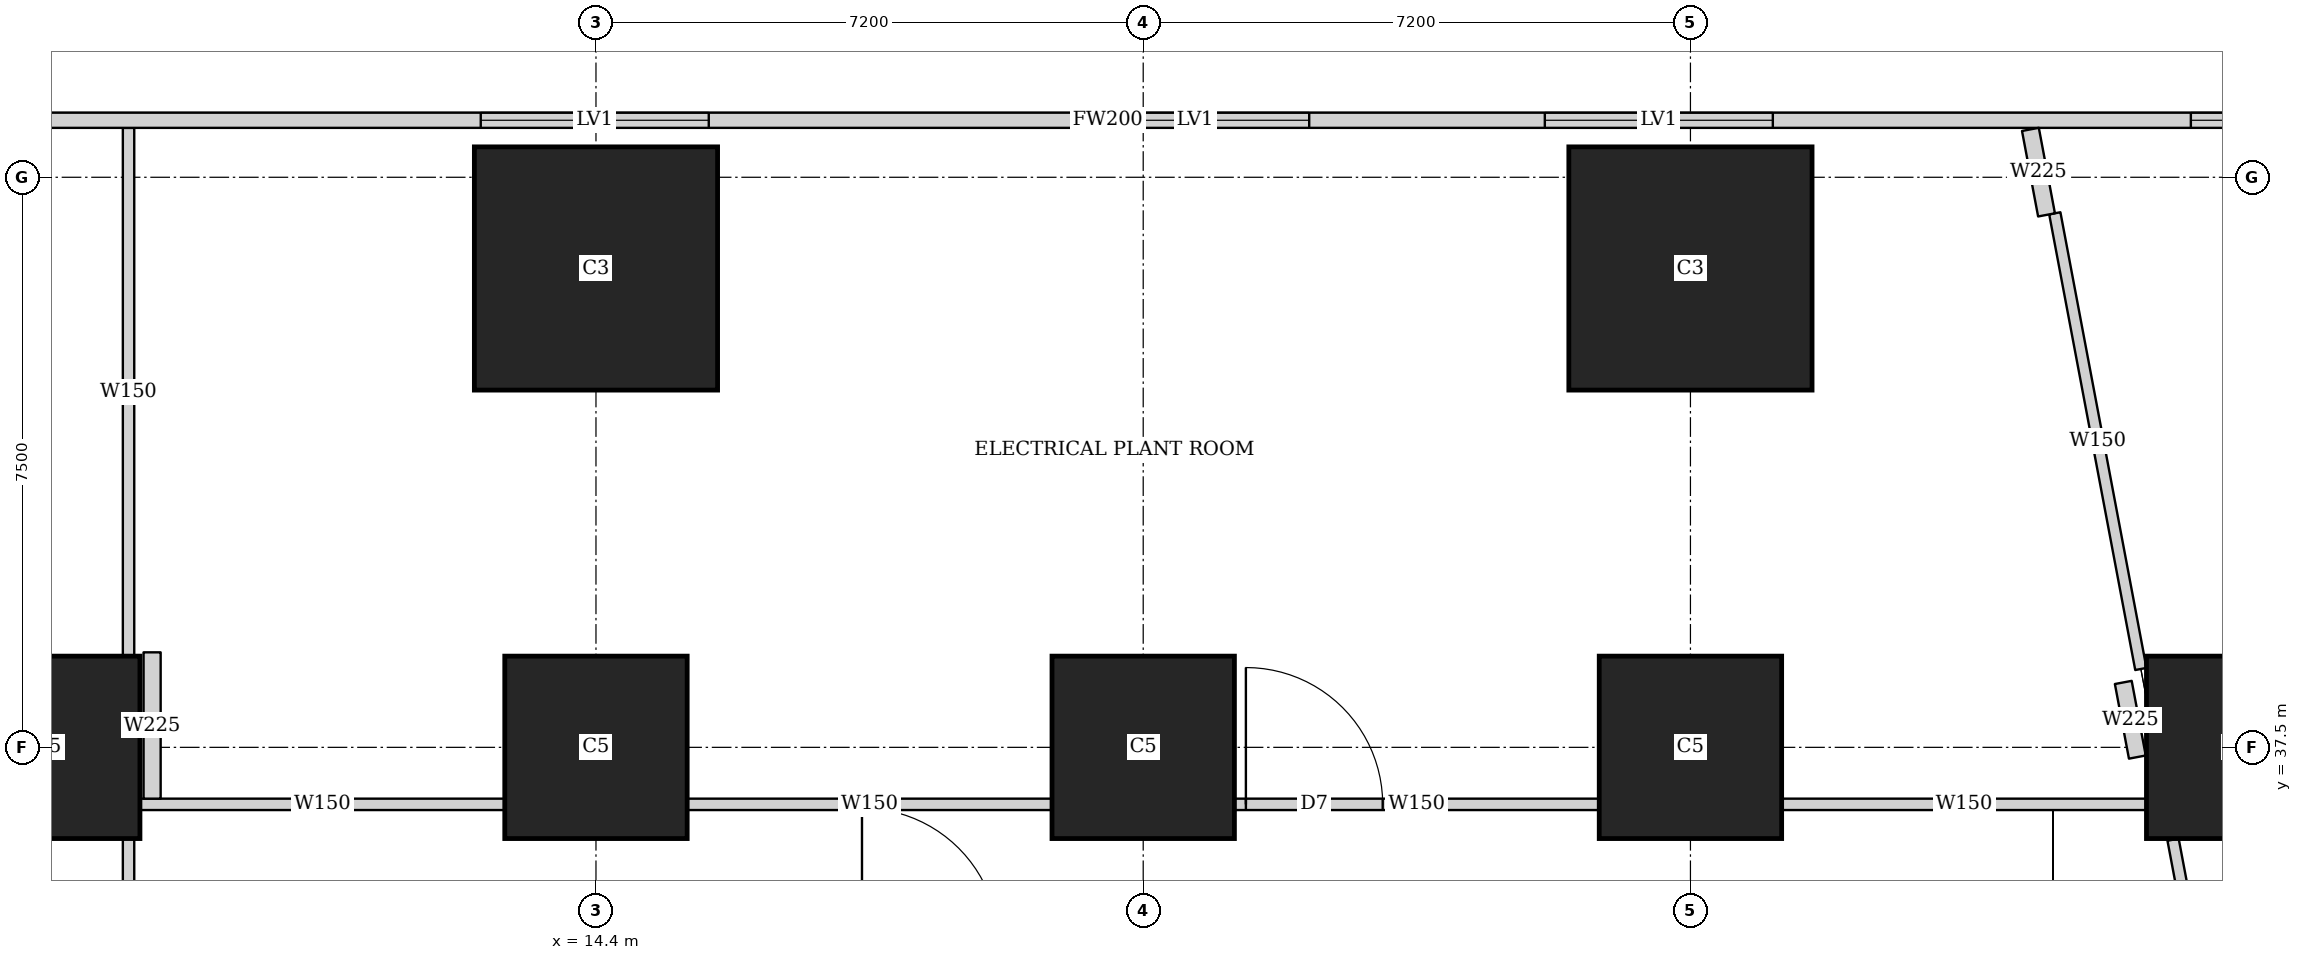
"""IFC4 building model, lengths in metres.
Left out: names, types, materials, properties, quantities, classifications, styles, units other than length and angle.
Written with IfcOpenShell. Run it as: python <this file> out.ifc"""

import sys

from ifc_helpers import new_model, si_unit, direction, frame, frame_2d, origin, origin_2d, place, context, subcontext, project, spatial, rectangle, extrude, element, fill, save


model = new_model("IFC4")
c1 = context("Model", 3, precision=1e-05, world=origin(), true_north=direction((0.0, 1.0)))
c2 = subcontext(c1, "Body", "Model", "MODEL_VIEW")
j1 = project(units=[si_unit("LENGTHUNIT", "METRE"), si_unit("PLANEANGLEUNIT", "RADIAN")], contexts=[c1])
p1 = place(None, origin())
s1 = spatial("IfcSite", under=j1, at=p1, CompositionType="ELEMENT")
p2 = place(p1, origin())
s2 = spatial("IfcBuilding", under=s1, at=p2, CompositionType="ELEMENT")
p3 = place(p2, frame((0.0, 0.0, 14.6)))
s3 = spatial("IfcBuildingStorey", under=s2, at=p3, CompositionType="ELEMENT", Elevation=14.6)
for number, where, z_axis, x_axis in (
    (1, (7.2, 37.5, 0.0), (0.0, 0.0, 1.0), (1.0, 0.0, 0.0)),
    (2, (14.4, 37.5, 0.0), (0.0, 0.0, 1.0), (1.0, 0.0, 0.0)),
    (3, (21.6, 37.5, 0.0), (0.0, 0.0, 1.0), (1.0, 0.0, 0.0)),
    (4, (28.8, 37.5, 0.0), (0.0, 0.0, 1.0), (1.0, 0.0, 0.0)),
    (5, (36.0, 37.5, 0.0), (0.0, 0.0, 1.0), (1.0, 0.0, 0.0)),
):
    element("IfcColumn", number, at=place(p3, frame(where, z_axis=z_axis, x_axis=x_axis)), inside=s3, PredefinedType="COLUMN", context=c2, shape_type="SweptSolid", body=[
        extrude(rectangle(XDim=2.4, YDim=2.4, at=origin_2d()), origin(), (0.0, 0.0, 1.0), 5.4),
    ])
for number, where, z_axis, x_axis in (
    (6, (14.4, 43.8, 0.0), (0.0, 0.0, 1.0), (1.0, 0.0, 0.0)),
    (7, (28.8, 43.8, 0.0), (0.0, 0.0, 1.0), (1.0, 0.0, 0.0)),
):
    element("IfcColumn", number, at=place(p3, frame(where, z_axis=z_axis, x_axis=x_axis)), inside=s3, PredefinedType="COLUMN", context=c2, shape_type="SweptSolid", body=[
        extrude(rectangle(XDim=3.2, YDim=3.2, at=origin_2d()), origin(), (0.0, 0.0, 1.0), 5.4),
    ])
p4 = place(p3, frame((40.106, 45.75, 0.0), z_axis=(0.0, 0.0, 1.0), x_axis=(-1.0, 0.0, 0.0)))
e8 = element("IfcWall", 8, at=p4, inside=s3, PredefinedType="SOLIDWALL", context=c2, shape_type="SweptSolid", body=[
    extrude(rectangle(XDim=37.943, YDim=0.2, at=frame_2d((18.971, 0.0))), origin(), (0.0, 0.0, 1.0), 5.1),
])
p5 = place(p4, frame((1.722, 0.0, 0.6)))
e9 = element("IfcOpeningElement", 9, at=p5, cuts=e8, PredefinedType="OPENING", context=c2, shape_type="SweptSolid", body=[
    extrude(rectangle(XDim=3.0, YDim=2.4, at=frame_2d((1.5, 1.2))), frame((0.0, 0.11, 0.0), z_axis=(0.0, -1.0, 0.0), x_axis=(1.0, 0.0, 0.0)), (0.0, 0.0, 1.0), 0.22),
])
p6 = place(p4, frame((10.222, 0.0, 0.6)))
e10 = element("IfcOpeningElement", 10, at=p6, cuts=e8, PredefinedType="OPENING", context=c2, shape_type="SweptSolid", body=[
    extrude(rectangle(XDim=3.0, YDim=2.4, at=frame_2d((1.5, 1.2))), frame((0.0, 0.11, 0.0), z_axis=(0.0, -1.0, 0.0), x_axis=(1.0, 0.0, 0.0)), (0.0, 0.0, 1.0), 0.22),
])
p7 = place(p4, frame((16.322, 0.0, 0.6)))
e11 = element("IfcOpeningElement", 11, at=p7, cuts=e8, PredefinedType="OPENING", context=c2, shape_type="SweptSolid", body=[
    extrude(rectangle(XDim=3.0, YDim=2.4, at=frame_2d((1.5, 1.2))), frame((0.0, 0.11, 0.0), z_axis=(0.0, -1.0, 0.0), x_axis=(1.0, 0.0, 0.0)), (0.0, 0.0, 1.0), 0.22),
])
p8 = place(p4, frame((24.222, 0.0, 0.6)))
e12 = element("IfcOpeningElement", 12, at=p8, cuts=e8, PredefinedType="OPENING", context=c2, shape_type="SweptSolid", body=[
    extrude(rectangle(XDim=3.0, YDim=2.4, at=frame_2d((1.5, 1.2))), frame((0.0, 0.11, 0.0), z_axis=(0.0, -1.0, 0.0), x_axis=(1.0, 0.0, 0.0)), (0.0, 0.0, 1.0), 0.22),
])
p9 = place(p4, frame((33.222, 0.0, 0.6)))
e13 = element("IfcOpeningElement", 13, at=p9, cuts=e8, PredefinedType="OPENING", context=c2, shape_type="SweptSolid", body=[
    extrude(rectangle(XDim=3.0, YDim=2.4, at=frame_2d((1.5, 1.2))), frame((0.0, 0.11, 0.0), z_axis=(0.0, -1.0, 0.0), x_axis=(1.0, 0.0, 0.0)), (0.0, 0.0, 1.0), 0.22),
])
p10 = place(p3, frame((8.25, 31.201, 0.0), z_axis=(0.0, 0.0, 1.0), x_axis=(0.0, 1.0, 0.0)))
e14 = element("IfcWall", 14, at=p10, inside=s3, PredefinedType="SOLIDWALL", context=c2, shape_type="SweptSolid", body=[
    extrude(rectangle(XDim=5.098, YDim=0.15, at=frame_2d((2.549, 0.0))), origin(), (0.0, 0.0, 1.0), 5.1),
])
p11 = place(p3, frame((8.25, 38.701, 0.0), z_axis=(0.0, 0.0, 1.0), x_axis=(0.0, 1.0, 0.0)))
e15 = element("IfcWall", 15, at=p11, inside=s3, PredefinedType="SOLIDWALL", context=c2, shape_type="SweptSolid", body=[
    extrude(rectangle(XDim=6.949, YDim=0.15, at=frame_2d((3.475, 0.0))), origin(), (0.0, 0.0, 1.0), 5.1),
])
p12 = place(p3, frame((8.401, 36.75, 0.0), z_axis=(0.0, 0.0, 1.0), x_axis=(1.0, 0.0, 0.0)))
e16 = element("IfcWall", 16, at=p12, inside=s3, PredefinedType="SOLIDWALL", context=c2, shape_type="SweptSolid", body=[
    extrude(rectangle(XDim=4.798, YDim=0.15, at=frame_2d((2.399, 0.0))), origin(), (0.0, 0.0, 1.0), 3.5),
])
p13 = place(p3, frame((15.601, 36.75, 0.0), z_axis=(0.0, 0.0, 1.0), x_axis=(1.0, 0.0, 0.0)))
e17 = element("IfcWall", 17, at=p13, inside=s3, PredefinedType="SOLIDWALL", context=c2, shape_type="SweptSolid", body=[
    extrude(rectangle(XDim=4.798, YDim=0.15, at=frame_2d((2.399, 0.0))), origin(), (0.0, 0.0, 1.0), 3.5),
])
p14 = place(p3, frame((22.801, 36.75, 0.0), z_axis=(0.0, 0.0, 1.0), x_axis=(1.0, 0.0, 0.0)))
e18 = element("IfcWall", 18, at=p14, inside=s3, PredefinedType="SOLIDWALL", context=c2, shape_type="SweptSolid", body=[
    extrude(rectangle(XDim=4.798, YDim=0.15, at=frame_2d((2.399, 0.0))), origin(), (0.0, 0.0, 1.0), 3.5),
])
p15 = place(p14, frame((0.15, 0.0, 0.0)))
e19 = element("IfcOpeningElement", 19, at=p15, cuts=e18, PredefinedType="OPENING", context=c2, shape_type="SweptSolid", body=[
    extrude(rectangle(XDim=1.8, YDim=2.4, at=frame_2d((0.9, 1.2))), frame((0.0, 0.085, 0.0), z_axis=(0.0, -1.0, 0.0), x_axis=(1.0, 0.0, 0.0)), (0.0, 0.0, 1.0), 0.17),
])
p16 = place(p3, frame((30.001, 36.75, 0.0), z_axis=(0.0, 0.0, 1.0), x_axis=(1.0, 0.0, 0.0)))
e20 = element("IfcWall", 20, at=p16, inside=s3, PredefinedType="SOLIDWALL", context=c2, shape_type="SweptSolid", body=[
    extrude(rectangle(XDim=4.798, YDim=0.15, at=frame_2d((2.399, 0.0))), origin(), (0.0, 0.0, 1.0), 3.5),
])
p17 = place(p3, frame((33.594, 44.526, 0.0), z_axis=(0.0, 0.0, 1.0), x_axis=(0.18556169571, -0.982632615521, 0.0)))
e21 = element("IfcWall", 21, at=p17, inside=s3, PredefinedType="SOLIDWALL", context=c2, shape_type="SweptSolid", body=[
    extrude(rectangle(XDim=6.101, YDim=0.15, at=frame_2d((3.05, 0.0))), origin(), (0.0, 0.0, 1.0), 5.1),
])
p18 = place(p3, frame((35.15, 36.285, 0.0), z_axis=(0.0, 0.0, 1.0), x_axis=(0.185613484682, -0.982622834207, 0.0)))
e22 = element("IfcWall", 22, at=p18, inside=s3, PredefinedType="SOLIDWALL", context=c2, shape_type="SweptSolid", body=[
    extrude(rectangle(XDim=34.351, YDim=0.15, at=frame_2d((17.175, 0.0))), origin(), (0.0, 0.0, 1.0), 3.5),
])
p19 = place(p18, frame((13.652, 0.0, 0.0)))
e23 = element("IfcOpeningElement", 23, at=p19, cuts=e22, PredefinedType="OPENING", context=c2, shape_type="SweptSolid", body=[
    extrude(rectangle(XDim=1.8, YDim=2.4, at=frame_2d((0.9, 1.2))), frame((0.0, 0.085, 0.0), z_axis=(0.0, -1.0, 0.0), x_axis=(1.0, 0.0, 0.0)), (0.0, 0.0, 1.0), 0.17),
])
p20 = place(p3, frame((8.56, 36.825, 0.0), z_axis=(0.0, 0.0, 1.0), x_axis=(0.0, 1.0, 0.0)))
e24 = element("IfcWall", 24, at=p20, inside=s3, PredefinedType="SOLIDWALL", context=c2, shape_type="SweptSolid", body=[
    extrude(rectangle(XDim=1.925, YDim=0.225, at=frame_2d((0.962, 0.0))), origin(), (0.0, 0.0, 1.0), 3.5),
])
p21 = place(p3, frame((33.273, 45.63, 0.0), z_axis=(0.0, 0.0, 1.0), x_axis=(0.185318495177, -0.982678510676, 0.0)))
e25 = element("IfcWall", 25, at=p21, inside=s3, PredefinedType="SOLIDWALL", context=c2, shape_type="SweptSolid", body=[
    extrude(rectangle(XDim=1.145, YDim=0.225, at=frame_2d((0.572, 0.0))), origin(), (0.0, 0.0, 1.0), 5.1),
])
p22 = place(p3, frame((34.495, 38.354, 0.0), z_axis=(0.0, 0.0, 1.0), x_axis=(0.18496711727, -0.982744710252, 0.0)))
e26 = element("IfcWall", 26, at=p22, inside=s3, PredefinedType="SOLIDWALL", context=c2, shape_type="SweptSolid", body=[
    extrude(rectangle(XDim=0.999, YDim=0.225, at=frame_2d((0.5, 0.0))), origin(), (0.0, 0.0, 1.0), 3.5),
])
p23 = place(p5, origin())
e27 = element("IfcWindow", 27, at=p23, inside=s3, PartitioningType="SINGLE_PANEL", PredefinedType="USERDEFINED", context=c2, shape_type="SweptSolid", body=[
    extrude(rectangle(XDim=3.0, YDim=2.4, at=frame_2d((1.5, 1.2))), frame((0.0, 0.03, 0.0), z_axis=(0.0, -1.0, 0.0), x_axis=(1.0, 0.0, 0.0)), (0.0, 0.0, 1.0), 0.06),
])
fill(e9, e27)
p24 = place(p6, origin())
e28 = element("IfcWindow", 28, at=p24, inside=s3, PartitioningType="SINGLE_PANEL", PredefinedType="USERDEFINED", context=c2, shape_type="SweptSolid", body=[
    extrude(rectangle(XDim=3.0, YDim=2.4, at=frame_2d((1.5, 1.2))), frame((0.0, 0.03, 0.0), z_axis=(0.0, -1.0, 0.0), x_axis=(1.0, 0.0, 0.0)), (0.0, 0.0, 1.0), 0.06),
])
fill(e10, e28)
p25 = place(p7, origin())
e29 = element("IfcWindow", 29, at=p25, inside=s3, PartitioningType="SINGLE_PANEL", PredefinedType="USERDEFINED", context=c2, shape_type="SweptSolid", body=[
    extrude(rectangle(XDim=3.0, YDim=2.4, at=frame_2d((1.5, 1.2))), frame((0.0, 0.03, 0.0), z_axis=(0.0, -1.0, 0.0), x_axis=(1.0, 0.0, 0.0)), (0.0, 0.0, 1.0), 0.06),
])
fill(e11, e29)
p26 = place(p8, origin())
e30 = element("IfcWindow", 30, at=p26, inside=s3, PartitioningType="SINGLE_PANEL", PredefinedType="USERDEFINED", context=c2, shape_type="SweptSolid", body=[
    extrude(rectangle(XDim=3.0, YDim=2.4, at=frame_2d((1.5, 1.2))), frame((0.0, 0.03, 0.0), z_axis=(0.0, -1.0, 0.0), x_axis=(1.0, 0.0, 0.0)), (0.0, 0.0, 1.0), 0.06),
])
fill(e12, e30)
p27 = place(p15, origin())
e31 = element("IfcDoor", 31, at=p27, inside=s3, OperationType="DOUBLE_DOOR_SINGLE_SWING", PredefinedType="DOOR", context=c2, shape_type="SweptSolid", body=[
    extrude(rectangle(XDim=1.8, YDim=2.4, at=frame_2d((0.9, 1.2))), frame((0.0, 0.025, 0.0), z_axis=(0.0, -1.0, 0.0), x_axis=(1.0, 0.0, 0.0)), (0.0, 0.0, 1.0), 0.05),
])
fill(e19, e31)
save(model, sys.argv[1])
